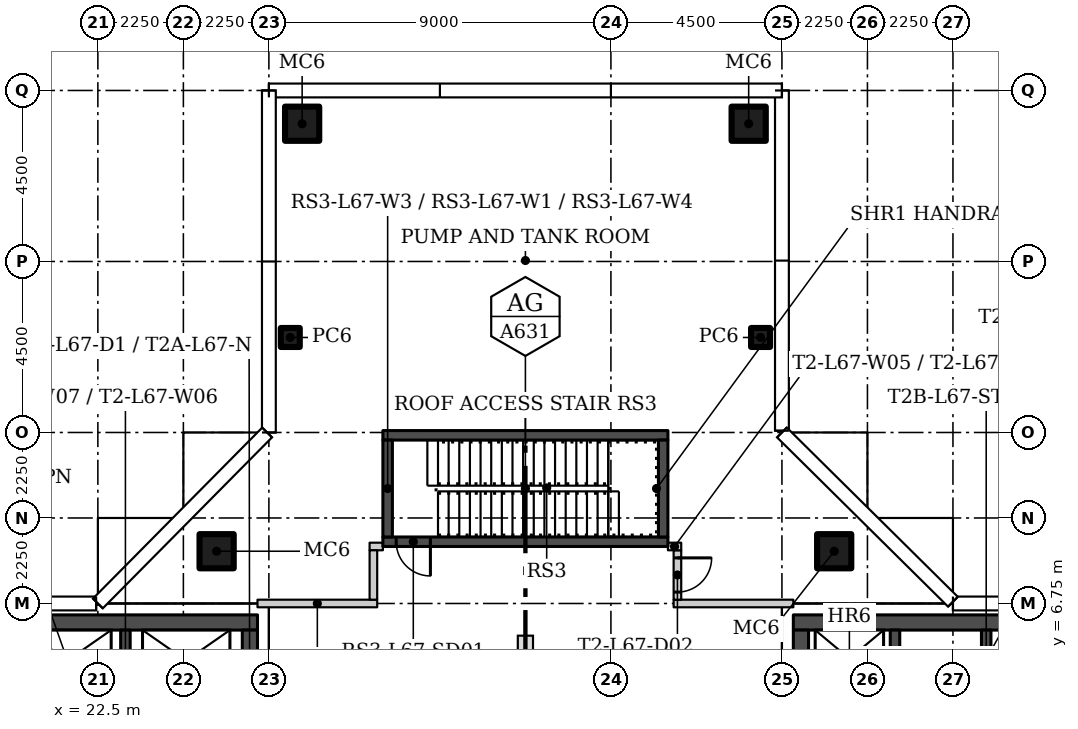
"""IFC4 building model, lengths in metres.
Left out: names, types, materials, properties, quantities, classifications, styles, units other than length and angle.
Written with IfcOpenShell. Run it as: python <this file> out.ifc"""

import sys

from ifc_helpers import new_model, si_unit, direction, frame, frame_2d, origin, origin_2d, place, context, subcontext, project, spatial, rectangle, hollow_rectangle, extrude, element, fill, save


model = new_model("IFC4")
c1 = context("Model", 3, precision=1e-05, world=origin(), true_north=direction((0.0, 1.0)))
c2 = subcontext(c1, "Body", "Model", "MODEL_VIEW")
j1 = project(units=[si_unit("LENGTHUNIT", "METRE"), si_unit("PLANEANGLEUNIT", "RADIAN")], contexts=[c1])
p1 = place(None, origin())
s1 = spatial("IfcSite", under=j1, at=p1, CompositionType="ELEMENT")
p2 = place(p1, origin())
s2 = spatial("IfcBuilding", under=s1, at=p2, CompositionType="ELEMENT")
p3 = place(p2, frame((0.0, 0.0, 278.3)))
s3 = spatial("IfcBuildingStorey", under=s2, at=p3, CompositionType="ELEMENT", Elevation=278.3)
for number, where in (
    (1, (25.625, 8.125, 0.0)),
    (2, (41.875, 8.125, 0.0)),
):
    element("IfcColumn", number, at=place(p3, frame(where)), inside=s3, PredefinedType="COLUMN", context=c2, shape_type="SweptSolid", body=[
        extrude(hollow_rectangle(XDim=0.9, YDim=0.9, WallThickness=0.036, at=origin_2d()), origin(), (0.0, 0.0, 1.0), 5.55),
    ])
p4 = place(p3, frame((39.938, 13.75, 0.0)))
e3 = element("IfcColumn", 3, at=p4, inside=s3, PredefinedType="COLUMN", context=c2, shape_type="SweptSolid", body=[
    extrude(hollow_rectangle(XDim=0.5, YDim=0.5, WallThickness=0.016, at=origin_2d()), origin(), (0.0, 0.0, 1.0), 5.55),
])
p5 = place(p3, frame((39.625, 19.375, 0.0)))
e4 = element("IfcColumn", 4, at=p5, inside=s3, PredefinedType="COLUMN", context=c2, shape_type="SweptSolid", body=[
    extrude(hollow_rectangle(XDim=0.9, YDim=0.9, WallThickness=0.036, at=origin_2d()), origin(), (0.0, 0.0, 1.0), 5.55),
])
p6 = place(p3, frame((27.562, 13.75, 0.0)))
e5 = element("IfcColumn", 5, at=p6, inside=s3, PredefinedType="COLUMN", context=c2, shape_type="SweptSolid", body=[
    extrude(hollow_rectangle(XDim=0.5, YDim=0.5, WallThickness=0.016, at=origin_2d()), origin(), (0.0, 0.0, 1.0), 5.55),
])
p7 = place(p3, frame((27.875, 19.375, 0.0)))
e6 = element("IfcColumn", 6, at=p7, inside=s3, PredefinedType="COLUMN", context=c2, shape_type="SweptSolid", body=[
    extrude(hollow_rectangle(XDim=0.9, YDim=0.9, WallThickness=0.036, at=origin_2d()), origin(), (0.0, 0.0, 1.0), 5.55),
])
for number, where in (
    (7, (37.65, 6.75, 0.0)),
    (8, (26.7, 6.75, 0.0)),
):
    element("IfcWall", number, at=place(p3, frame(where)), inside=s3, PredefinedType="PARTITIONING", context=c2, shape_type="SweptSolid", body=[
        extrude(rectangle(XDim=3.15, YDim=0.2, at=frame_2d((1.575, 0.0))), origin(), (0.0, 0.0, 1.0), 5.55),
    ])
p8 = place(p3, frame((37.75, 8.15, 0.0), z_axis=(0.0, 0.0, 1.0), x_axis=(0.0, -1.0, 0.0)))
e9 = element("IfcWall", 9, at=p8, inside=s3, PredefinedType="PARTITIONING", context=c2, shape_type="SweptSolid", body=[
    extrude(rectangle(XDim=1.3, YDim=0.2, at=frame_2d((0.65, 0.0))), origin(), (0.0, 0.0, 1.0), 5.55),
])
p9 = place(p8, frame((0.2, 0.0, 0.0)))
e10 = element("IfcOpeningElement", 10, at=p9, cuts=e9, PredefinedType="OPENING", context=c2, shape_type="SweptSolid", body=[
    extrude(rectangle(XDim=0.9, YDim=2.4, at=frame_2d((0.45, 1.2))), frame((0.0, 0.11, 0.0), z_axis=(0.0, -1.0, 0.0), x_axis=(1.0, 0.0, 0.0)), (0.0, 0.0, 1.0), 0.22),
])
for number, where in (
    (11, (37.5, 8.25, 0.0)),
    (12, (29.65, 8.25, 0.0)),
):
    element("IfcWall", number, at=place(p3, frame(where)), inside=s3, PredefinedType="PARTITIONING", context=c2, shape_type="SweptSolid", body=[
        extrude(rectangle(XDim=0.35, YDim=0.2, at=frame_2d((0.175, 0.0))), origin(), (0.0, 0.0, 1.0), 5.55),
    ])
p10 = place(p3, frame((29.75, 6.85, 0.0), z_axis=(0.0, 0.0, 1.0), x_axis=(0.0, 1.0, 0.0)))
e13 = element("IfcWall", 13, at=p10, inside=s3, PredefinedType="PARTITIONING", context=c2, shape_type="SweptSolid", body=[
    extrude(rectangle(XDim=1.3, YDim=0.2, at=frame_2d((0.65, 0.0))), origin(), (0.0, 0.0, 1.0), 5.55),
])
p11 = place(p3, frame((13.8, 6.25, 0.0)))
e14 = element("IfcWall", 14, at=p11, inside=s3, PredefinedType="SHEAR", context=c2, shape_type="SweptSolid", body=[
    extrude(rectangle(XDim=12.9, YDim=0.4, at=frame_2d((6.45, 0.0))), origin(), (0.0, 0.0, 1.0), 5.55),
])
p12 = place(p3, frame((26.5, 6.05, 0.0), z_axis=(0.0, 0.0, 1.0), x_axis=(0.0, -1.0, 0.0)))
e15 = element("IfcWall", 15, at=p12, inside=s3, PredefinedType="SHEAR", context=c2, shape_type="SweptSolid", body=[
    extrude(rectangle(XDim=12.1, YDim=0.4, at=frame_2d((6.05, 0.0))), origin(), (0.0, 0.0, 1.0), 5.55),
])
p13 = place(p12, frame((10.1, 0.0, 0.0)))
e16 = element("IfcOpeningElement", 16, at=p13, cuts=e15, PredefinedType="OPENING", context=c2, shape_type="SweptSolid", body=[
    extrude(rectangle(XDim=1.2, YDim=2.1, at=frame_2d((0.6, 1.05))), frame((0.0, 0.21, 0.0), z_axis=(0.0, -1.0, 0.0), x_axis=(1.0, 0.0, 0.0)), (0.0, 0.0, 1.0), 0.42),
])
p14 = place(p12, frame((3.9, 0.0, 0.0)))
e17 = element("IfcOpeningElement", 17, at=p14, cuts=e15, PredefinedType="OPENING", context=c2, shape_type="SweptSolid", body=[
    extrude(rectangle(XDim=1.8, YDim=2.4, at=frame_2d((0.9, 1.2))), frame((0.0, 0.21, 0.0), z_axis=(0.0, -1.0, 0.0), x_axis=(1.0, 0.0, 0.0)), (0.0, 0.0, 1.0), 0.42),
])
p15 = place(p3, frame((23.225, 3.25, 0.0), z_axis=(0.0, 0.0, 1.0), x_axis=(0.0, 1.0, 0.0)))
e18 = element("IfcWall", 18, at=p15, inside=s3, PredefinedType="SHEAR", context=c2, shape_type="SweptSolid", body=[
    extrude(rectangle(XDim=2.8, YDim=0.25, at=frame_2d((1.4, 0.0))), origin(), (0.0, 0.0, 1.0), 5.55),
])
p16 = place(p3, frame((53.7, 6.25, 0.0), z_axis=(0.0, 0.0, 1.0), x_axis=(-1.0, 0.0, 0.0)))
e19 = element("IfcWall", 19, at=p16, inside=s3, PredefinedType="SHEAR", context=c2, shape_type="SweptSolid", body=[
    extrude(rectangle(XDim=12.9, YDim=0.4, at=frame_2d((6.45, 0.0))), origin(), (0.0, 0.0, 1.0), 5.55),
])
p17 = place(p3, frame((41.0, -6.05, 0.0), z_axis=(0.0, 0.0, 1.0), x_axis=(0.0, 1.0, 0.0)))
e20 = element("IfcWall", 20, at=p17, inside=s3, PredefinedType="SHEAR", context=c2, shape_type="SweptSolid", body=[
    extrude(rectangle(XDim=12.1, YDim=0.4, at=frame_2d((6.05, 0.0))), origin(), (0.0, 0.0, 1.0), 5.55),
])
p18 = place(p17, frame((0.8, 0.0, 0.0)))
e21 = element("IfcOpeningElement", 21, at=p18, cuts=e20, PredefinedType="OPENING", context=c2, shape_type="SweptSolid", body=[
    extrude(rectangle(XDim=1.2, YDim=2.1, at=frame_2d((0.6, 1.05))), frame((0.0, 0.21, 0.0), z_axis=(0.0, -1.0, 0.0), x_axis=(1.0, 0.0, 0.0)), (0.0, 0.0, 1.0), 0.42),
])
p19 = place(p17, frame((6.4, 0.0, 0.0)))
e22 = element("IfcOpeningElement", 22, at=p19, cuts=e20, PredefinedType="OPENING", context=c2, shape_type="SweptSolid", body=[
    extrude(rectangle(XDim=1.8, YDim=2.4, at=frame_2d((0.9, 1.2))), frame((0.0, 0.21, 0.0), z_axis=(0.0, -1.0, 0.0), x_axis=(1.0, 0.0, 0.0)), (0.0, 0.0, 1.0), 0.42),
])
for number, where, z_axis, x_axis in (
    (23, (45.875, 3.25, 0.0), (0.0, 0.0, 1.0), (0.0, 1.0, 0.0)),
    (24, (43.475, 3.25, 0.0), (0.0, 0.0, 1.0), (0.0, 1.0, 0.0)),
):
    element("IfcWall", number, at=place(p3, frame(where, z_axis=z_axis, x_axis=x_axis)), inside=s3, PredefinedType="SHEAR", context=c2, shape_type="SweptSolid", body=[
        extrude(rectangle(XDim=2.8, YDim=0.25, at=frame_2d((1.4, 0.0))), origin(), (0.0, 0.0, 1.0), 5.55),
    ])
p20 = place(p3, frame((37.5, 8.375, 0.0), z_axis=(0.0, 0.0, 1.0), x_axis=(-1.0, 0.0, 0.0)))
e25 = element("IfcWall", 25, at=p20, inside=s3, PredefinedType="SHEAR", context=c2, shape_type="SweptSolid", body=[
    extrude(rectangle(XDim=7.5, YDim=0.25, at=frame_2d((3.75, 0.0))), origin(), (0.0, 0.0, 1.0), 5.55),
])
p21 = place(p20, frame((6.25, 0.0, 0.0)))
e26 = element("IfcOpeningElement", 26, at=p21, cuts=e25, PredefinedType="OPENING", context=c2, shape_type="SweptSolid", body=[
    extrude(rectangle(XDim=0.9, YDim=2.1, at=frame_2d((0.45, 1.05))), frame((0.0, 0.135, 0.0), z_axis=(0.0, -1.0, 0.0), x_axis=(1.0, 0.0, 0.0)), (0.0, 0.0, 1.0), 0.27),
])
p22 = place(p3, frame((30.0, 11.175, 0.0)))
e27 = element("IfcWall", 27, at=p22, inside=s3, PredefinedType="SHEAR", context=c2, shape_type="SweptSolid", body=[
    extrude(rectangle(XDim=7.5, YDim=0.25, at=frame_2d((3.75, 0.0))), origin(), (0.0, 0.0, 1.0), 5.55),
])
for number, where, z_axis, x_axis in (
    (28, (30.125, 8.5, 0.0), (0.0, 0.0, 1.0), (0.0, 1.0, 0.0)),
    (29, (37.375, 8.5, 0.0), (0.0, 0.0, 1.0), (0.0, 1.0, 0.0)),
):
    element("IfcWall", number, at=place(p3, frame(where, z_axis=z_axis, x_axis=x_axis)), inside=s3, PredefinedType="SHEAR", context=c2, shape_type="SweptSolid", body=[
        extrude(rectangle(XDim=2.55, YDim=0.25, at=frame_2d((1.275, 0.0))), origin(), (0.0, 0.0, 1.0), 5.55),
    ])
p23 = place(p9, origin())
e30 = element("IfcDoor", 30, at=p23, inside=s3, OperationType="SINGLE_SWING_LEFT", PredefinedType="DOOR", context=c2, shape_type="SweptSolid", body=[
    extrude(rectangle(XDim=0.9, YDim=2.4, at=frame_2d((0.45, 1.2))), frame((0.0, 0.025, 0.0), z_axis=(0.0, -1.0, 0.0), x_axis=(1.0, 0.0, 0.0)), (0.0, 0.0, 1.0), 0.05),
])
fill(e10, e30)
p24 = place(p21, origin())
e31 = element("IfcDoor", 31, at=p24, inside=s3, OperationType="SINGLE_SWING_RIGHT", PredefinedType="DOOR", context=c2, shape_type="SweptSolid", body=[
    extrude(rectangle(XDim=0.9, YDim=2.1, at=frame_2d((0.45, 1.05))), frame((0.0, 0.025, 0.0), z_axis=(0.0, -1.0, 0.0), x_axis=(1.0, 0.0, 0.0)), (0.0, 0.0, 1.0), 0.05),
])
fill(e26, e31)
save(model, sys.argv[1])
